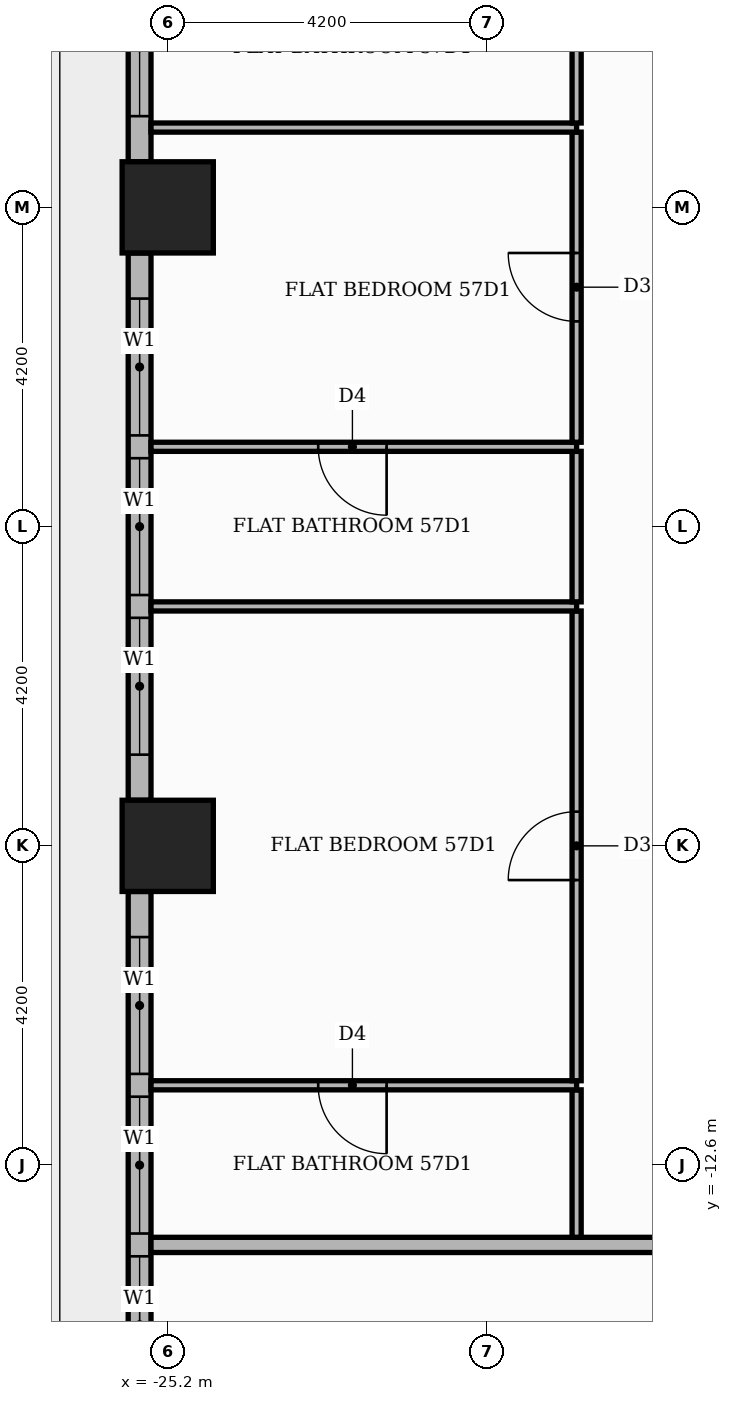
"""IFC4 building model, lengths in metres.
Left out: names, types, materials, properties, quantities, classifications, styles, units other than length and angle.
Written with IfcOpenShell. Run it as: python <this file> out.ifc"""

import sys

from ifc_helpers import new_model, si_unit, direction, frame, frame_2d, origin, origin_2d, place, context, subcontext, project, spatial, rectangle, extrude, element, fill, save


model = new_model("IFC4")
c1 = context("Model", 3, precision=1e-05, world=origin(), true_north=direction((0.0, 1.0)))
c2 = subcontext(c1, "Body", "Model", "MODEL_VIEW")
j1 = project(units=[si_unit("LENGTHUNIT", "METRE"), si_unit("PLANEANGLEUNIT", "RADIAN")], contexts=[c1])
p1 = place(None, origin())
s1 = spatial("IfcSite", under=j1, at=p1, CompositionType="ELEMENT")
p2 = place(p1, origin())
s2 = spatial("IfcBuilding", under=s1, at=p2, CompositionType="ELEMENT")
p3 = place(p2, frame((0.0, 0.0, 240.6)))
s3 = spatial("IfcBuildingStorey", under=s2, at=p3, CompositionType="ELEMENT", Elevation=240.6)
for number, where, z_axis, x_axis in (
    (1, (-25.2, 0.0, 0.0), (0.0, 0.0, 1.0), (1.0, 0.0, 0.0)),
    (2, (-25.2, -8.4, 0.0), (0.0, 0.0, 1.0), (1.0, 0.0, 0.0)),
):
    element("IfcColumn", number, at=place(p3, frame(where, z_axis=z_axis, x_axis=x_axis)), inside=s3, PredefinedType="COLUMN", context=c2, shape_type="SweptSolid", body=[
        extrude(rectangle(XDim=1.2, YDim=1.2, at=origin_2d()), origin(), (0.0, 0.0, 1.0), 3.9),
    ])
p4 = place(p3, frame((-25.57, 7.8, 0.0), z_axis=(0.0, 0.0, 1.0), x_axis=(0.0, -1.0, 0.0)))
e3 = element("IfcWall", 3, at=p4, inside=s3, PredefinedType="STANDARD", context=c2, shape_type="SweptSolid", body=[
    extrude(rectangle(XDim=7.2, YDim=0.3, at=frame_2d((3.6, 0.0))), origin(), (0.0, 0.0, 1.0), 3.48),
])
p5 = place(p4, frame((0.6, 0.0, 0.0)))
e4 = element("IfcOpeningElement", 4, at=p5, cuts=e3, PredefinedType="OPENING", context=c2, shape_type="SweptSolid", body=[
    extrude(rectangle(XDim=1.8, YDim=2.4, at=frame_2d((0.9, 1.2))), frame((0.0, 0.16, 0.0), z_axis=(0.0, -1.0, 0.0), x_axis=(1.0, 0.0, 0.0)), (0.0, 0.0, 1.0), 0.32),
])
p6 = place(p4, frame((2.7, 0.0, 0.9)))
e5 = element("IfcOpeningElement", 5, at=p6, cuts=e3, PredefinedType="OPENING", context=c2, shape_type="SweptSolid", body=[
    extrude(rectangle(XDim=1.8, YDim=2.1, at=frame_2d((0.9, 1.05))), frame((0.0, 0.16, 0.0), z_axis=(0.0, -1.0, 0.0), x_axis=(1.0, 0.0, 0.0)), (0.0, 0.0, 1.0), 0.32),
])
p7 = place(p4, frame((4.8, 0.0, 0.9)))
e6 = element("IfcOpeningElement", 6, at=p7, cuts=e3, PredefinedType="OPENING", context=c2, shape_type="SweptSolid", body=[
    extrude(rectangle(XDim=1.8, YDim=2.1, at=frame_2d((0.9, 1.05))), frame((0.0, 0.16, 0.0), z_axis=(0.0, -1.0, 0.0), x_axis=(1.0, 0.0, 0.0)), (0.0, 0.0, 1.0), 0.32),
])
p8 = place(p3, frame((-25.57, -0.6, 0.0), z_axis=(0.0, 0.0, 1.0), x_axis=(0.0, -1.0, 0.0)))
e7 = element("IfcWall", 7, at=p8, inside=s3, PredefinedType="STANDARD", context=c2, shape_type="SweptSolid", body=[
    extrude(rectangle(XDim=7.2, YDim=0.3, at=frame_2d((3.6, 0.0))), origin(), (0.0, 0.0, 1.0), 3.48),
])
p9 = place(p8, frame((0.6, 0.0, 0.9)))
e8 = element("IfcOpeningElement", 8, at=p9, cuts=e7, PredefinedType="OPENING", context=c2, shape_type="SweptSolid", body=[
    extrude(rectangle(XDim=1.8, YDim=2.1, at=frame_2d((0.9, 1.05))), frame((0.0, 0.16, 0.0), z_axis=(0.0, -1.0, 0.0), x_axis=(1.0, 0.0, 0.0)), (0.0, 0.0, 1.0), 0.32),
])
p10 = place(p8, frame((2.7, 0.0, 0.9)))
e9 = element("IfcOpeningElement", 9, at=p10, cuts=e7, PredefinedType="OPENING", context=c2, shape_type="SweptSolid", body=[
    extrude(rectangle(XDim=1.8, YDim=2.1, at=frame_2d((0.9, 1.05))), frame((0.0, 0.16, 0.0), z_axis=(0.0, -1.0, 0.0), x_axis=(1.0, 0.0, 0.0)), (0.0, 0.0, 1.0), 0.32),
])
p11 = place(p8, frame((4.8, 0.0, 0.9)))
e10 = element("IfcOpeningElement", 10, at=p11, cuts=e7, PredefinedType="OPENING", context=c2, shape_type="SweptSolid", body=[
    extrude(rectangle(XDim=1.8, YDim=2.1, at=frame_2d((0.9, 1.05))), frame((0.0, 0.16, 0.0), z_axis=(0.0, -1.0, 0.0), x_axis=(1.0, 0.0, 0.0)), (0.0, 0.0, 1.0), 0.32),
])
p12 = place(p3, frame((-25.57, -9.0, 0.0), z_axis=(0.0, 0.0, 1.0), x_axis=(0.0, -1.0, 0.0)))
e11 = element("IfcWall", 11, at=p12, inside=s3, PredefinedType="STANDARD", context=c2, shape_type="SweptSolid", body=[
    extrude(rectangle(XDim=7.2, YDim=0.3, at=frame_2d((3.6, 0.0))), origin(), (0.0, 0.0, 1.0), 3.48),
])
p13 = place(p12, frame((0.6, 0.0, 0.9)))
e12 = element("IfcOpeningElement", 12, at=p13, cuts=e11, PredefinedType="OPENING", context=c2, shape_type="SweptSolid", body=[
    extrude(rectangle(XDim=1.8, YDim=2.1, at=frame_2d((0.9, 1.05))), frame((0.0, 0.16, 0.0), z_axis=(0.0, -1.0, 0.0), x_axis=(1.0, 0.0, 0.0)), (0.0, 0.0, 1.0), 0.32),
])
p14 = place(p12, frame((2.7, 0.0, 0.9)))
e13 = element("IfcOpeningElement", 13, at=p14, cuts=e11, PredefinedType="OPENING", context=c2, shape_type="SweptSolid", body=[
    extrude(rectangle(XDim=1.8, YDim=2.1, at=frame_2d((0.9, 1.05))), frame((0.0, 0.16, 0.0), z_axis=(0.0, -1.0, 0.0), x_axis=(1.0, 0.0, 0.0)), (0.0, 0.0, 1.0), 0.32),
])
p15 = place(p12, frame((4.8, 0.0, 0.9)))
e14 = element("IfcOpeningElement", 14, at=p15, cuts=e11, PredefinedType="OPENING", context=c2, shape_type="SweptSolid", body=[
    extrude(rectangle(XDim=1.8, YDim=2.1, at=frame_2d((0.9, 1.05))), frame((0.0, 0.16, 0.0), z_axis=(0.0, -1.0, 0.0), x_axis=(1.0, 0.0, 0.0)), (0.0, 0.0, 1.0), 0.32),
])
p16 = place(p3, frame((-25.42, -13.65, 0.0), z_axis=(0.0, 0.0, 1.0), x_axis=(1.0, 0.0, 0.0)))
e15 = element("IfcWall", 15, at=p16, inside=s3, PredefinedType="PARTITIONING", context=c2, shape_type="SweptSolid", body=[
    extrude(rectangle(XDim=39.07, YDim=0.2, at=frame_2d((19.535, 0.0))), origin(), (0.0, 0.0, 1.0), 3.48),
])
p17 = place(p16, frame((13.32, 0.0, 0.0)))
e16 = element("IfcOpeningElement", 16, at=p17, cuts=e15, PredefinedType="OPENING", context=c2, shape_type="SweptSolid", body=[
    extrude(rectangle(XDim=1.1, YDim=2.4, at=frame_2d((0.55, 1.2))), frame((0.0, 0.11, 0.0), z_axis=(0.0, -1.0, 0.0), x_axis=(1.0, 0.0, 0.0)), (0.0, 0.0, 1.0), 0.22),
])
p18 = place(p3, frame((-19.82, -13.55, 0.0), z_axis=(0.0, 0.0, 1.0), x_axis=(0.0, 1.0, 0.0)))
e17 = element("IfcWall", 17, at=p18, inside=s3, PredefinedType="PARTITIONING", context=c2, shape_type="SweptSolid", body=[
    extrude(rectangle(XDim=1.94, YDim=0.12, at=frame_2d((0.97, 0.0))), origin(), (0.0, 0.0, 1.0), 3.48),
])
p19 = place(p3, frame((-25.42, -11.55, 0.0), z_axis=(0.0, 0.0, 1.0), x_axis=(1.0, 0.0, 0.0)))
e18 = element("IfcWall", 18, at=p19, inside=s3, PredefinedType="PARTITIONING", context=c2, shape_type="SweptSolid", body=[
    extrude(rectangle(XDim=5.6, YDim=0.12, at=frame_2d((2.8, 0.0))), origin(), (0.0, 0.0, 1.0), 3.48),
])
p20 = place(p19, frame((2.2, 0.0, 0.0)))
e19 = element("IfcOpeningElement", 19, at=p20, cuts=e18, PredefinedType="OPENING", context=c2, shape_type="SweptSolid", body=[
    extrude(rectangle(XDim=0.9, YDim=2.1, at=frame_2d((0.45, 1.05))), frame((0.0, 0.07, 0.0), z_axis=(0.0, -1.0, 0.0), x_axis=(1.0, 0.0, 0.0)), (0.0, 0.0, 1.0), 0.14),
])
p21 = place(p3, frame((-19.82, -11.49, 0.0), z_axis=(0.0, 0.0, 1.0), x_axis=(0.0, 1.0, 0.0)))
e20 = element("IfcWall", 20, at=p21, inside=s3, PredefinedType="PARTITIONING", context=c2, shape_type="SweptSolid", body=[
    extrude(rectangle(XDim=6.18, YDim=0.12, at=frame_2d((3.09, 0.0))), origin(), (0.0, 0.0, 1.0), 3.48),
])
p22 = place(p21, frame((2.64, 0.0, 0.0)))
e21 = element("IfcOpeningElement", 21, at=p22, cuts=e20, PredefinedType="OPENING", context=c2, shape_type="SweptSolid", body=[
    extrude(rectangle(XDim=0.9, YDim=2.1, at=frame_2d((0.45, 1.05))), frame((0.0, 0.07, 0.0), z_axis=(0.0, -1.0, 0.0), x_axis=(1.0, 0.0, 0.0)), (0.0, 0.0, 1.0), 0.14),
])
p23 = place(p3, frame((-25.42, -5.25, 0.0), z_axis=(0.0, 0.0, 1.0), x_axis=(1.0, 0.0, 0.0)))
e22 = element("IfcWall", 22, at=p23, inside=s3, PredefinedType="PARTITIONING", context=c2, shape_type="SweptSolid", body=[
    extrude(rectangle(XDim=5.6, YDim=0.12, at=frame_2d((2.8, 0.0))), origin(), (0.0, 0.0, 1.0), 3.48),
])
p24 = place(p3, frame((-19.82, -5.19, 0.0), z_axis=(0.0, 0.0, 1.0), x_axis=(0.0, 1.0, 0.0)))
e23 = element("IfcWall", 23, at=p24, inside=s3, PredefinedType="PARTITIONING", context=c2, shape_type="SweptSolid", body=[
    extrude(rectangle(XDim=1.98, YDim=0.12, at=frame_2d((0.99, 0.0))), origin(), (0.0, 0.0, 1.0), 3.48),
])
p25 = place(p3, frame((-25.42, -3.15, 0.0), z_axis=(0.0, 0.0, 1.0), x_axis=(1.0, 0.0, 0.0)))
e24 = element("IfcWall", 24, at=p25, inside=s3, PredefinedType="PARTITIONING", context=c2, shape_type="SweptSolid", body=[
    extrude(rectangle(XDim=5.6, YDim=0.12, at=frame_2d((2.8, 0.0))), origin(), (0.0, 0.0, 1.0), 3.48),
])
p26 = place(p25, frame((2.2, 0.0, 0.0)))
e25 = element("IfcOpeningElement", 25, at=p26, cuts=e24, PredefinedType="OPENING", context=c2, shape_type="SweptSolid", body=[
    extrude(rectangle(XDim=0.9, YDim=2.1, at=frame_2d((0.45, 1.05))), frame((0.0, 0.07, 0.0), z_axis=(0.0, -1.0, 0.0), x_axis=(1.0, 0.0, 0.0)), (0.0, 0.0, 1.0), 0.14),
])
p27 = place(p3, frame((-19.82, -3.09, 0.0), z_axis=(0.0, 0.0, 1.0), x_axis=(0.0, 1.0, 0.0)))
e26 = element("IfcWall", 26, at=p27, inside=s3, PredefinedType="PARTITIONING", context=c2, shape_type="SweptSolid", body=[
    extrude(rectangle(XDim=4.08, YDim=0.12, at=frame_2d((2.04, 0.0))), origin(), (0.0, 0.0, 1.0), 3.48),
])
p28 = place(p27, frame((1.59, 0.0, 0.0)))
e27 = element("IfcOpeningElement", 27, at=p28, cuts=e26, PredefinedType="OPENING", context=c2, shape_type="SweptSolid", body=[
    extrude(rectangle(XDim=0.9, YDim=2.1, at=frame_2d((0.45, 1.05))), frame((0.0, 0.07, 0.0), z_axis=(0.0, -1.0, 0.0), x_axis=(1.0, 0.0, 0.0)), (0.0, 0.0, 1.0), 0.14),
])
p29 = place(p3, frame((-25.42, 1.05, 0.0), z_axis=(0.0, 0.0, 1.0), x_axis=(1.0, 0.0, 0.0)))
e28 = element("IfcWall", 28, at=p29, inside=s3, PredefinedType="PARTITIONING", context=c2, shape_type="SweptSolid", body=[
    extrude(rectangle(XDim=5.6, YDim=0.12, at=frame_2d((2.8, 0.0))), origin(), (0.0, 0.0, 1.0), 3.48),
])
p30 = place(p3, frame((-19.82, 1.11, 0.0), z_axis=(0.0, 0.0, 1.0), x_axis=(0.0, 1.0, 0.0)))
e29 = element("IfcWall", 29, at=p30, inside=s3, PredefinedType="PARTITIONING", context=c2, shape_type="SweptSolid", body=[
    extrude(rectangle(XDim=1.98, YDim=0.12, at=frame_2d((0.99, 0.0))), origin(), (0.0, 0.0, 1.0), 3.48),
])
p31 = place(p7, origin())
e30 = element("IfcWindow", 30, at=p31, inside=s3, PartitioningType="SINGLE_PANEL", PredefinedType="WINDOW", context=c2, shape_type="SweptSolid", body=[
    extrude(rectangle(XDim=1.8, YDim=2.1, at=frame_2d((0.9, 1.05))), frame((0.0, 0.03, 0.0), z_axis=(0.0, -1.0, 0.0), x_axis=(1.0, 0.0, 0.0)), (0.0, 0.0, 1.0), 0.06),
])
fill(e6, e30)
p32 = place(p9, origin())
e31 = element("IfcWindow", 31, at=p32, inside=s3, PartitioningType="SINGLE_PANEL", PredefinedType="WINDOW", context=c2, shape_type="SweptSolid", body=[
    extrude(rectangle(XDim=1.8, YDim=2.1, at=frame_2d((0.9, 1.05))), frame((0.0, 0.03, 0.0), z_axis=(0.0, -1.0, 0.0), x_axis=(1.0, 0.0, 0.0)), (0.0, 0.0, 1.0), 0.06),
])
fill(e8, e31)
p33 = place(p10, origin())
e32 = element("IfcWindow", 32, at=p33, inside=s3, PartitioningType="SINGLE_PANEL", PredefinedType="WINDOW", context=c2, shape_type="SweptSolid", body=[
    extrude(rectangle(XDim=1.8, YDim=2.1, at=frame_2d((0.9, 1.05))), frame((0.0, 0.03, 0.0), z_axis=(0.0, -1.0, 0.0), x_axis=(1.0, 0.0, 0.0)), (0.0, 0.0, 1.0), 0.06),
])
fill(e9, e32)
p34 = place(p11, origin())
e33 = element("IfcWindow", 33, at=p34, inside=s3, PartitioningType="SINGLE_PANEL", PredefinedType="WINDOW", context=c2, shape_type="SweptSolid", body=[
    extrude(rectangle(XDim=1.8, YDim=2.1, at=frame_2d((0.9, 1.05))), frame((0.0, 0.03, 0.0), z_axis=(0.0, -1.0, 0.0), x_axis=(1.0, 0.0, 0.0)), (0.0, 0.0, 1.0), 0.06),
])
fill(e10, e33)
p35 = place(p13, origin())
e34 = element("IfcWindow", 34, at=p35, inside=s3, PartitioningType="SINGLE_PANEL", PredefinedType="WINDOW", context=c2, shape_type="SweptSolid", body=[
    extrude(rectangle(XDim=1.8, YDim=2.1, at=frame_2d((0.9, 1.05))), frame((0.0, 0.03, 0.0), z_axis=(0.0, -1.0, 0.0), x_axis=(1.0, 0.0, 0.0)), (0.0, 0.0, 1.0), 0.06),
])
fill(e12, e34)
p36 = place(p14, origin())
e35 = element("IfcWindow", 35, at=p36, inside=s3, PartitioningType="SINGLE_PANEL", PredefinedType="WINDOW", context=c2, shape_type="SweptSolid", body=[
    extrude(rectangle(XDim=1.8, YDim=2.1, at=frame_2d((0.9, 1.05))), frame((0.0, 0.03, 0.0), z_axis=(0.0, -1.0, 0.0), x_axis=(1.0, 0.0, 0.0)), (0.0, 0.0, 1.0), 0.06),
])
fill(e13, e35)
p37 = place(p15, origin())
e36 = element("IfcWindow", 36, at=p37, inside=s3, PartitioningType="SINGLE_PANEL", PredefinedType="WINDOW", context=c2, shape_type="SweptSolid", body=[
    extrude(rectangle(XDim=1.8, YDim=2.1, at=frame_2d((0.9, 1.05))), frame((0.0, 0.03, 0.0), z_axis=(0.0, -1.0, 0.0), x_axis=(1.0, 0.0, 0.0)), (0.0, 0.0, 1.0), 0.06),
])
fill(e14, e36)
p38 = place(p28, origin())
e37 = element("IfcDoor", 37, at=p38, inside=s3, OperationType="SINGLE_SWING_RIGHT", PredefinedType="DOOR", context=c2, shape_type="SweptSolid", body=[
    extrude(rectangle(XDim=0.9, YDim=2.1, at=frame_2d((0.45, 1.05))), frame((0.0, 0.025, 0.0), z_axis=(0.0, -1.0, 0.0), x_axis=(1.0, 0.0, 0.0)), (0.0, 0.0, 1.0), 0.05),
])
fill(e27, e37)
p39 = place(p26, frame((0.9, 0.0, 0.0), z_axis=(0.0, 0.0, 1.0), x_axis=(-1.0, 0.0, 0.0)))
e38 = element("IfcDoor", 38, at=p39, inside=s3, OperationType="SINGLE_SWING_RIGHT", PredefinedType="DOOR", context=c2, shape_type="SweptSolid", body=[
    extrude(rectangle(XDim=0.9, YDim=2.1, at=frame_2d((0.45, 1.05))), frame((0.0, 0.025, 0.0), z_axis=(0.0, -1.0, 0.0), x_axis=(1.0, 0.0, 0.0)), (0.0, 0.0, 1.0), 0.05),
])
fill(e25, e38)
p40 = place(p22, origin())
e39 = element("IfcDoor", 39, at=p40, inside=s3, OperationType="SINGLE_SWING_LEFT", PredefinedType="DOOR", context=c2, shape_type="SweptSolid", body=[
    extrude(rectangle(XDim=0.9, YDim=2.1, at=frame_2d((0.45, 1.05))), frame((0.0, 0.025, 0.0), z_axis=(0.0, -1.0, 0.0), x_axis=(1.0, 0.0, 0.0)), (0.0, 0.0, 1.0), 0.05),
])
fill(e21, e39)
p41 = place(p20, frame((0.9, 0.0, 0.0), z_axis=(0.0, 0.0, 1.0), x_axis=(-1.0, 0.0, 0.0)))
e40 = element("IfcDoor", 40, at=p41, inside=s3, OperationType="SINGLE_SWING_RIGHT", PredefinedType="DOOR", context=c2, shape_type="SweptSolid", body=[
    extrude(rectangle(XDim=0.9, YDim=2.1, at=frame_2d((0.45, 1.05))), frame((0.0, 0.025, 0.0), z_axis=(0.0, -1.0, 0.0), x_axis=(1.0, 0.0, 0.0)), (0.0, 0.0, 1.0), 0.05),
])
fill(e19, e40)
save(model, sys.argv[1])
